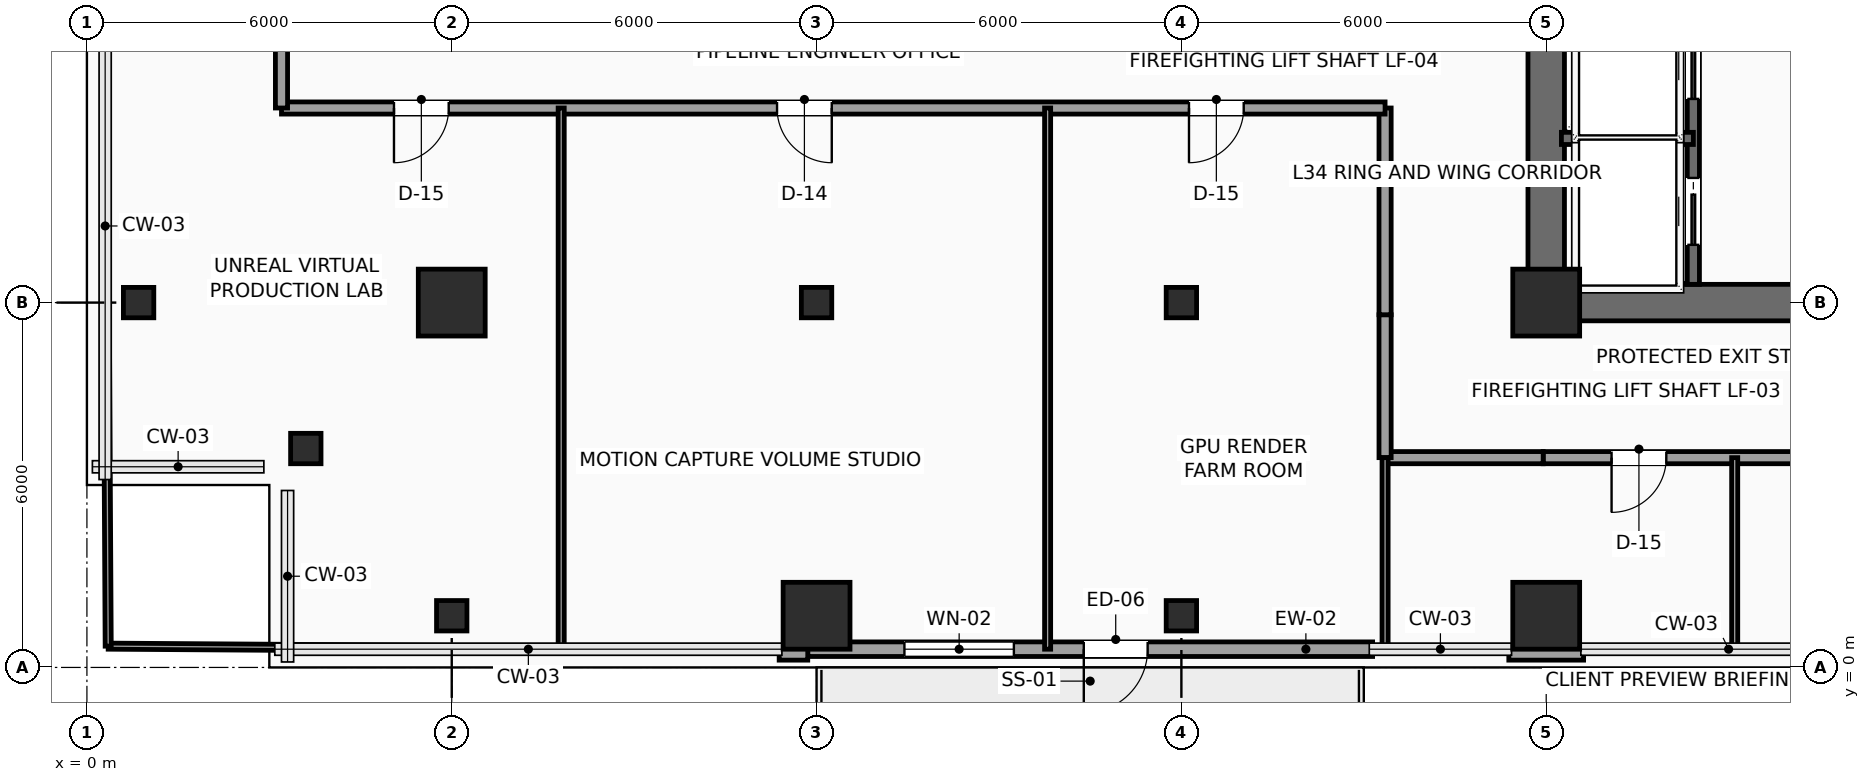
"""IFC4 building model, lengths in metres.
Left out: names, types, materials, properties, quantities, classifications, styles, units other than length and angle.
Written with IfcOpenShell. Run it as: python <this file> out.ifc"""

import sys

from ifc_helpers import new_model, si_unit, direction, frame, frame_2d, origin, origin_2d, place, context, subcontext, project, spatial, rectangle, hollow_rectangle, extrude, element, fill, save


model = new_model("IFC4")
c1 = context("Model", 3, precision=1e-05, world=origin(), true_north=direction((0.0, 1.0)))
c2 = subcontext(c1, "Body", "Model", "MODEL_VIEW")
j1 = project(units=[si_unit("LENGTHUNIT", "METRE"), si_unit("PLANEANGLEUNIT", "RADIAN")], contexts=[c1])
p1 = place(None, origin())
s1 = spatial("IfcSite", under=j1, at=p1, CompositionType="ELEMENT")
p2 = place(p1, origin())
s2 = spatial("IfcBuilding", under=s1, at=p2, CompositionType="ELEMENT")
p3 = place(p2, frame((0.0, 0.0, 141.9)))
s3 = spatial("IfcBuildingStorey", under=s2, at=p3, CompositionType="ELEMENT", Elevation=141.9)
p4 = place(p3, frame((24.0, 6.0, 0.0), z_axis=(0.0, 0.0, 1.0), x_axis=(1.0, 0.0, 0.0)))
e1 = element("IfcColumn", 1, at=p4, inside=s3, PredefinedType="COLUMN", context=c2, shape_type="SweptSolid", body=[
    extrude(rectangle(XDim=1.1, YDim=1.1, at=origin_2d()), origin(), (0.0, 0.0, 1.0), 3.75),
])
for number, where, z_axis, x_axis in (
    (2, (3.6, 3.6, 0.0), (0.0, 0.0, 1.0), (1.0, 0.0, 0.0)),
    (3, (0.85, 6.0, 0.0), (0.0, 0.0, 1.0), (1.0, 0.0, 0.0)),
    (4, (6.0, 0.85, 0.0), (0.0, 0.0, 1.0), (1.0, 0.0, 0.0)),
):
    element("IfcColumn", number, at=place(p3, frame(where, z_axis=z_axis, x_axis=x_axis)), inside=s3, PredefinedType="COLUMN", context=c2, shape_type="SweptSolid", body=[
        extrude(hollow_rectangle(XDim=0.5, YDim=0.5, WallThickness=0.025, InnerFilletRadius=0.025, OuterFilletRadius=0.04, at=origin_2d()), origin(), (0.0, 0.0, 1.0), 3.75),
    ])
for number, where, z_axis, x_axis in (
    (5, (6.0, 6.0, 0.0), (0.0, 0.0, 1.0), (1.0, 0.0, 0.0)),
    (6, (12.0, 0.85, 0.0), (0.0, 0.0, 1.0), (1.0, 0.0, 0.0)),
):
    element("IfcColumn", number, at=place(p3, frame(where, z_axis=z_axis, x_axis=x_axis)), inside=s3, PredefinedType="COLUMN", context=c2, shape_type="SweptSolid", body=[
        extrude(rectangle(XDim=1.1, YDim=1.1, at=origin_2d()), origin(), (0.0, 0.0, 1.0), 3.75),
    ])
for number, where, z_axis, x_axis in (
    (7, (12.0, 6.0, 0.0), (0.0, 0.0, 1.0), (1.0, 0.0, 0.0)),
    (8, (18.0, 0.85, 0.0), (0.0, 0.0, 1.0), (1.0, 0.0, 0.0)),
    (9, (18.0, 6.0, 0.0), (0.0, 0.0, 1.0), (1.0, 0.0, 0.0)),
):
    element("IfcColumn", number, at=place(p3, frame(where, z_axis=z_axis, x_axis=x_axis)), inside=s3, PredefinedType="COLUMN", context=c2, shape_type="SweptSolid", body=[
        extrude(hollow_rectangle(XDim=0.5, YDim=0.5, WallThickness=0.025, InnerFilletRadius=0.025, OuterFilletRadius=0.04, at=origin_2d()), origin(), (0.0, 0.0, 1.0), 3.75),
    ])
p5 = place(p3, frame((24.0, 0.85, 0.0), z_axis=(0.0, 0.0, 1.0), x_axis=(1.0, 0.0, 0.0)))
e10 = element("IfcColumn", 10, at=p5, inside=s3, PredefinedType="COLUMN", context=c2, shape_type="SweptSolid", body=[
    extrude(rectangle(XDim=1.1, YDim=1.1, at=origin_2d()), origin(), (0.0, 0.0, 1.0), 3.75),
])
p6 = place(p3, frame((21.145, 0.3, 0.0), z_axis=(0.0, 0.0, 1.0), x_axis=(-1.0, 0.0, 0.0)))
e11 = element("IfcWall", 11, at=p6, inside=s3, PredefinedType="SOLIDWALL", context=c2, shape_type="SweptSolid", body=[
    extrude(rectangle(XDim=9.29, YDim=0.24, at=frame_2d((4.645, 0.0))), origin(), (0.0, 0.0, 1.0), 3.525),
])
p7 = place(p6, frame((3.7, 0.0, 0.0)))
e12 = element("IfcOpeningElement", 12, at=p7, cuts=e11, PredefinedType="OPENING", context=c2, shape_type="SweptSolid", body=[
    extrude(rectangle(XDim=1.05, YDim=2.2, at=frame_2d((0.525, 1.1))), frame((0.0, 0.13, 0.0), z_axis=(0.0, -1.0, 0.0), x_axis=(1.0, 0.0, 0.0)), (0.0, 0.0, 1.0), 0.26),
])
p8 = place(p6, frame((5.9, 0.0, 0.85)))
e13 = element("IfcOpeningElement", 13, at=p8, cuts=e11, PredefinedType="OPENING", context=c2, shape_type="SweptSolid", body=[
    extrude(rectangle(XDim=1.8, YDim=2.1, at=frame_2d((0.9, 1.05))), frame((0.0, 0.13, 0.0), z_axis=(0.0, -1.0, 0.0), x_axis=(1.0, 0.0, 0.0)), (0.0, 0.0, 1.0), 0.26),
])
p9 = place(p3, frame((24.615, 0.24, 0.0), z_axis=(0.0, 0.0, 1.0), x_axis=(-1.0, 0.0, 0.0)))
e14 = element("IfcWall", 14, at=p9, inside=s3, PredefinedType="SOLIDWALL", context=c2, shape_type="SweptSolid", body=[
    extrude(rectangle(XDim=1.23, YDim=0.24, at=frame_2d((0.615, 0.0))), origin(), (0.0, 0.0, 1.0), 3.525),
])
p10 = place(p3, frame((11.855, 0.24, 0.0), z_axis=(0.0, 0.0, 1.0), x_axis=(-1.0, 0.0, 0.0)))
e15 = element("IfcWall", 15, at=p10, inside=s3, PredefinedType="SOLIDWALL", context=c2, shape_type="SweptSolid", body=[
    extrude(rectangle(XDim=0.47, YDim=0.24, at=frame_2d((0.235, 0.0))), origin(), (0.0, 0.0, 1.0), 3.525),
])
p11 = place(p3, frame((24.0, 6.0, 0.0), z_axis=(0.0, 0.0, 1.0), x_axis=(1.0, 0.0, 0.0)))
e16 = element("IfcWall", 16, at=p11, inside=s3, PredefinedType="SHEAR", context=c2, shape_type="SweptSolid", body=[
    extrude(rectangle(XDim=9.6, YDim=0.6, at=frame_2d((4.8, 0.0))), origin(), (0.0, 0.0, 1.0), 3.525),
])
p12 = place(p3, frame((24.0, 6.0, 0.0), z_axis=(0.0, 0.0, 1.0), x_axis=(0.0, 1.0, 0.0)))
e17 = element("IfcWall", 17, at=p12, inside=s3, PredefinedType="SHEAR", context=c2, shape_type="SweptSolid", body=[
    extrude(rectangle(XDim=12.0, YDim=0.6, at=frame_2d((6.0, 0.0))), origin(), (0.0, 0.0, 1.0), 3.525),
])
p13 = place(p12, frame((7.15, 0.0, 0.0)))
e18 = element("IfcOpeningElement", 18, at=p13, cuts=e17, PredefinedType="OPENING", context=c2, shape_type="SweptSolid", body=[
    extrude(rectangle(XDim=1.6, YDim=2.3, at=frame_2d((0.8, 1.15))), frame((0.0, 0.31, 0.0), z_axis=(0.0, -1.0, 0.0), x_axis=(1.0, 0.0, 0.0)), (0.0, 0.0, 1.0), 0.62),
])
p14 = place(p3, frame((26.42, 6.3, 0.0), z_axis=(0.0, 0.0, 1.0), x_axis=(0.0, 1.0, 0.0)))
e19 = element("IfcWall", 19, at=p14, inside=s3, PredefinedType="SHEAR", context=c2, shape_type="SweptSolid", body=[
    extrude(rectangle(XDim=4.95, YDim=0.2, at=frame_2d((2.475, 0.0))), origin(), (0.0, 0.0, 1.0), 3.525),
])
p15 = place(p14, frame((0.65, 0.0, 0.0)))
e20 = element("IfcOpeningElement", 20, at=p15, cuts=e19, PredefinedType="OPENING", context=c2, shape_type="SweptSolid", body=[
    extrude(rectangle(XDim=1.1, YDim=2.2, at=frame_2d((0.55, 1.1))), frame((0.0, 0.11, 0.0), z_axis=(0.0, -1.0, 0.0), x_axis=(1.0, 0.0, 0.0)), (0.0, 0.0, 1.0), 0.22),
])
p16 = place(p14, frame((3.05, 0.0, 0.0)))
e21 = element("IfcOpeningElement", 21, at=p16, cuts=e19, PredefinedType="OPENING", context=c2, shape_type="SweptSolid", body=[
    extrude(rectangle(XDim=1.1, YDim=2.2, at=frame_2d((0.55, 1.1))), frame((0.0, 0.11, 0.0), z_axis=(0.0, -1.0, 0.0), x_axis=(1.0, 0.0, 0.0)), (0.0, 0.0, 1.0), 0.22),
])
p17 = place(p3, frame((24.25, 8.7, 0.0), z_axis=(0.0, 0.0, 1.0), x_axis=(1.0, 0.0, 0.0)))
e22 = element("IfcWall", 22, at=p17, inside=s3, PredefinedType="SHEAR", context=c2, shape_type="SweptSolid", body=[
    extrude(rectangle(XDim=2.17, YDim=0.2, at=frame_2d((1.085, 0.0))), origin(), (0.0, 0.0, 1.0), 3.525),
])
p18 = place(p3, frame((36.15, 3.45, 0.0), z_axis=(0.0, 0.0, 1.0), x_axis=(-1.0, 0.0, 0.0)))
e23 = element("IfcWall", 23, at=p18, inside=s3, PredefinedType="PARTITIONING", context=c2, shape_type="SweptSolid", body=[
    extrude(rectangle(XDim=12.2, YDim=0.2, at=frame_2d((6.1, 0.0))), origin(), (0.0, 0.0, 1.0), 3.067),
])
p19 = place(p18, frame((10.175, 0.0, 0.0)))
e24 = element("IfcOpeningElement", 24, at=p19, cuts=e23, PredefinedType="OPENING", context=c2, shape_type="SweptSolid", body=[
    extrude(rectangle(XDim=0.9, YDim=2.1, at=frame_2d((0.45, 1.05))), frame((0.0, 0.11, 0.0), z_axis=(0.0, -1.0, 0.0), x_axis=(1.0, 0.0, 0.0)), (0.0, 0.0, 1.0), 0.22),
])
p20 = place(p18, frame((5.75, 0.0, 0.0)))
e25 = element("IfcOpeningElement", 25, at=p20, cuts=e23, PredefinedType="OPENING", context=c2, shape_type="SweptSolid", body=[
    extrude(rectangle(XDim=0.9, YDim=2.1, at=frame_2d((0.45, 1.05))), frame((0.0, 0.11, 0.0), z_axis=(0.0, -1.0, 0.0), x_axis=(1.0, 0.0, 0.0)), (0.0, 0.0, 1.0), 0.22),
])
p21 = place(p3, frame((23.95, 3.45, 0.0), z_axis=(0.0, 0.0, 1.0), x_axis=(-1.0, 0.0, 0.0)))
e26 = element("IfcWall", 26, at=p21, inside=s3, PredefinedType="PARTITIONING", context=c2, shape_type="SweptSolid", body=[
    extrude(rectangle(XDim=2.6, YDim=0.2, at=frame_2d((1.3, 0.0))), origin(), (0.0, 0.0, 1.0), 3.067),
])
p22 = place(p3, frame((21.35, 3.45, 0.0), z_axis=(0.0, 0.0, 1.0), x_axis=(0.0, 1.0, 0.0)))
e27 = element("IfcWall", 27, at=p22, inside=s3, PredefinedType="PARTITIONING", context=c2, shape_type="SweptSolid", body=[
    extrude(rectangle(XDim=2.35, YDim=0.2, at=frame_2d((1.175, 0.0))), origin(), (0.0, 0.0, 1.0), 3.525),
])
p23 = place(p3, frame((21.35, 5.8, 0.0), z_axis=(0.0, 0.0, 1.0), x_axis=(0.0, 1.0, 0.0)))
e28 = element("IfcWall", 28, at=p23, inside=s3, PredefinedType="PARTITIONING", context=c2, shape_type="SweptSolid", body=[
    extrude(rectangle(XDim=3.4, YDim=0.2, at=frame_2d((1.7, 0.0))), origin(), (0.0, 0.0, 1.0), 3.525),
])
p24 = place(p3, frame((21.35, 9.2, 0.0), z_axis=(0.0, 0.0, 1.0), x_axis=(-1.0, 0.0, 0.0)))
e29 = element("IfcWall", 29, at=p24, inside=s3, PredefinedType="PARTITIONING", context=c2, shape_type="SweptSolid", body=[
    extrude(rectangle(XDim=18.15, YDim=0.2, at=frame_2d((9.075, 0.0))), origin(), (0.0, 0.0, 1.0), 3.067),
])
p25 = place(p24, frame((15.4, 0.0, 0.0)))
e30 = element("IfcOpeningElement", 30, at=p25, cuts=e29, PredefinedType="OPENING", context=c2, shape_type="SweptSolid", body=[
    extrude(rectangle(XDim=0.9, YDim=2.1, at=frame_2d((0.45, 1.05))), frame((0.0, 0.11, 0.0), z_axis=(0.0, -1.0, 0.0), x_axis=(1.0, 0.0, 0.0)), (0.0, 0.0, 1.0), 0.22),
])
p26 = place(p24, frame((9.1, 0.0, 0.0)))
e31 = element("IfcOpeningElement", 31, at=p26, cuts=e29, PredefinedType="OPENING", context=c2, shape_type="SweptSolid", body=[
    extrude(rectangle(XDim=0.9, YDim=2.1, at=frame_2d((0.45, 1.05))), frame((0.0, 0.11, 0.0), z_axis=(0.0, -1.0, 0.0), x_axis=(1.0, 0.0, 0.0)), (0.0, 0.0, 1.0), 0.22),
])
p27 = place(p24, frame((2.325, 0.0, 0.0)))
e32 = element("IfcOpeningElement", 32, at=p27, cuts=e29, PredefinedType="OPENING", context=c2, shape_type="SweptSolid", body=[
    extrude(rectangle(XDim=0.9, YDim=2.1, at=frame_2d((0.45, 1.05))), frame((0.0, 0.11, 0.0), z_axis=(0.0, -1.0, 0.0), x_axis=(1.0, 0.0, 0.0)), (0.0, 0.0, 1.0), 0.22),
])
p28 = place(p3, frame((3.2, 9.2, 0.0), z_axis=(0.0, 0.0, 1.0), x_axis=(0.0, 1.0, 0.0)))
e33 = element("IfcWall", 33, at=p28, inside=s3, PredefinedType="PARTITIONING", context=c2, shape_type="SweptSolid", body=[
    extrude(rectangle(XDim=2.05, YDim=0.2, at=frame_2d((1.025, 0.0))), origin(), (0.0, 0.0, 1.0), 3.525),
])
for number, where, z_axis, x_axis in (
    (34, (21.35, 0.3, 0.0), (0.0, 0.0, 1.0), (0.0, 1.0, 0.0)),
    (35, (27.1, 0.3, 0.0), (0.0, 0.0, 1.0), (0.0, 1.0, 0.0)),
):
    element("IfcWall", number, at=place(p3, frame(where, z_axis=z_axis, x_axis=x_axis)), inside=s3, PredefinedType="PARTITIONING", context=c2, shape_type="SweptSolid", body=[
        extrude(rectangle(XDim=3.15, YDim=0.1, at=frame_2d((1.575, 0.0))), origin(), (0.0, 0.0, 1.0), 3.525),
    ])
p29 = place(p3, frame((0.35, 0.35, 0.0), z_axis=(0.0, 0.0, 1.0), x_axis=(0.999977434951, -0.006717855945, 0.0)))
e36 = element("IfcWall", 36, at=p29, inside=s3, PredefinedType="PARTITIONING", context=c2, shape_type="SweptSolid", body=[
    extrude(rectangle(XDim=7.45, YDim=0.1, at=frame_2d((3.725, 0.0))), origin(), (0.0, 0.0, 1.0), 3.525),
])
p30 = place(p3, frame((0.35, 0.35, 0.0), z_axis=(0.0, 0.0, 1.0), x_axis=(-0.005655237989, 0.999984009014, 0.0)))
e37 = element("IfcWall", 37, at=p30, inside=s3, PredefinedType="PARTITIONING", context=c2, shape_type="SweptSolid", body=[
    extrude(rectangle(XDim=8.85, YDim=0.1, at=frame_2d((4.425, 0.0))), origin(), (0.0, 0.0, 1.0), 3.525),
])
for number, where, z_axis, x_axis in (
    (38, (7.8, 0.3, 0.0), (0.0, 0.0, 1.0), (0.0, 1.0, 0.0)),
    (39, (15.8, 0.3, 0.0), (0.0, 0.0, 1.0), (0.0, 1.0, 0.0)),
):
    element("IfcWall", number, at=place(p3, frame(where, z_axis=z_axis, x_axis=x_axis)), inside=s3, PredefinedType="PARTITIONING", context=c2, shape_type="SweptSolid", body=[
        extrude(rectangle(XDim=8.9, YDim=0.1, at=frame_2d((4.45, 0.0))), origin(), (0.0, 0.0, 1.0), 3.525),
    ])
p31 = place(p7, origin())
e40 = element("IfcDoor", 40, at=p31, inside=s3, OperationType="SINGLE_SWING_RIGHT", PredefinedType="DOOR", context=c2, shape_type="SweptSolid", body=[
    extrude(rectangle(XDim=1.05, YDim=2.2, at=frame_2d((0.525, 1.1))), frame((0.0, 0.025, 0.0), z_axis=(0.0, -1.0, 0.0), x_axis=(1.0, 0.0, 0.0)), (0.0, 0.0, 1.0), 0.05),
])
fill(e12, e40)
p32 = place(p8, origin())
e41 = element("IfcWindow", 41, at=p32, inside=s3, PartitioningType="SINGLE_PANEL", PredefinedType="WINDOW", context=c2, shape_type="SweptSolid", body=[
    extrude(rectangle(XDim=1.8, YDim=2.1, at=frame_2d((0.9, 1.05))), frame((0.0, 0.03, 0.0), z_axis=(0.0, -1.0, 0.0), x_axis=(1.0, 0.0, 0.0)), (0.0, 0.0, 1.0), 0.06),
])
fill(e13, e41)
p33 = place(p15, origin())
e42 = element("IfcDoor", 42, at=p33, inside=s3, OperationType="SLIDING_TO_LEFT", PredefinedType="DOOR", context=c2, shape_type="SweptSolid", body=[
    extrude(rectangle(XDim=1.1, YDim=2.2, at=frame_2d((0.55, 1.1))), frame((0.0, 0.025, 0.0), z_axis=(0.0, -1.0, 0.0), x_axis=(1.0, 0.0, 0.0)), (0.0, 0.0, 1.0), 0.05),
])
fill(e20, e42)
p34 = place(p16, origin())
e43 = element("IfcDoor", 43, at=p34, inside=s3, OperationType="SLIDING_TO_LEFT", PredefinedType="DOOR", context=c2, shape_type="SweptSolid", body=[
    extrude(rectangle(XDim=1.1, YDim=2.2, at=frame_2d((0.55, 1.1))), frame((0.0, 0.025, 0.0), z_axis=(0.0, -1.0, 0.0), x_axis=(1.0, 0.0, 0.0)), (0.0, 0.0, 1.0), 0.05),
])
fill(e21, e43)
p35 = place(p19, origin())
e44 = element("IfcDoor", 44, at=p35, inside=s3, OperationType="SINGLE_SWING_RIGHT", PredefinedType="DOOR", context=c2, shape_type="SweptSolid", body=[
    extrude(rectangle(XDim=0.9, YDim=2.1, at=frame_2d((0.45, 1.05))), frame((0.0, 0.025, 0.0), z_axis=(0.0, -1.0, 0.0), x_axis=(1.0, 0.0, 0.0)), (0.0, 0.0, 1.0), 0.05),
])
fill(e24, e44)
p36 = place(p25, origin())
e45 = element("IfcDoor", 45, at=p36, inside=s3, OperationType="SINGLE_SWING_RIGHT", PredefinedType="DOOR", context=c2, shape_type="SweptSolid", body=[
    extrude(rectangle(XDim=0.9, YDim=2.1, at=frame_2d((0.45, 1.05))), frame((0.0, 0.025, 0.0), z_axis=(0.0, -1.0, 0.0), x_axis=(1.0, 0.0, 0.0)), (0.0, 0.0, 1.0), 0.05),
])
fill(e30, e45)
p37 = place(p26, origin())
e46 = element("IfcDoor", 46, at=p37, inside=s3, OperationType="SINGLE_SWING_LEFT", PredefinedType="DOOR", context=c2, shape_type="SweptSolid", body=[
    extrude(rectangle(XDim=0.9, YDim=2.1, at=frame_2d((0.45, 1.05))), frame((0.0, 0.025, 0.0), z_axis=(0.0, -1.0, 0.0), x_axis=(1.0, 0.0, 0.0)), (0.0, 0.0, 1.0), 0.05),
])
fill(e31, e46)
p38 = place(p27, origin())
e47 = element("IfcDoor", 47, at=p38, inside=s3, OperationType="SINGLE_SWING_RIGHT", PredefinedType="DOOR", context=c2, shape_type="SweptSolid", body=[
    extrude(rectangle(XDim=0.9, YDim=2.1, at=frame_2d((0.45, 1.05))), frame((0.0, 0.025, 0.0), z_axis=(0.0, -1.0, 0.0), x_axis=(1.0, 0.0, 0.0)), (0.0, 0.0, 1.0), 0.05),
])
fill(e32, e47)
save(model, sys.argv[1])
